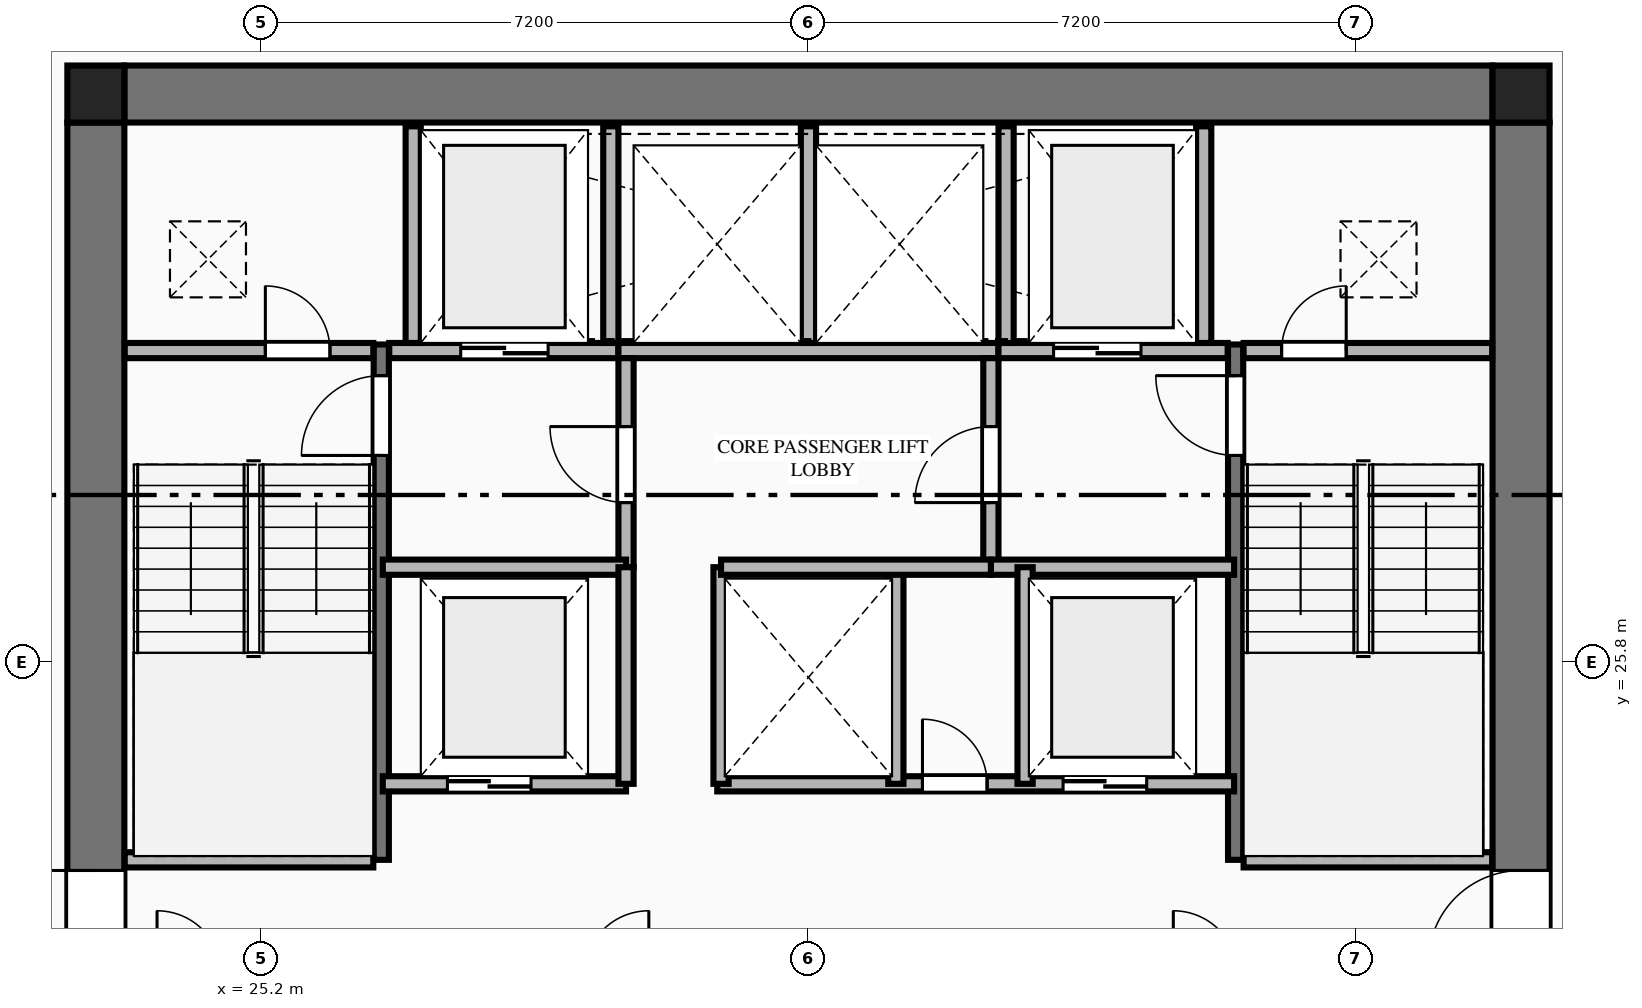
"""IFC4 building model, lengths in metres.
Left out: names, types, materials, properties, quantities, classifications, styles, units other than length and angle.
Written with IfcOpenShell. Run it as: python <this file> out.ifc"""

import sys

from ifc_helpers import new_model, si_unit, direction, frame, frame_2d, origin, origin_2d, place, context, subcontext, project, spatial, rectangle, extrude, element, fill, save


model = new_model("IFC4")
c1 = context("Model", 3, precision=1e-05, world=origin(), true_north=direction((0.0, 1.0)))
c2 = subcontext(c1, "Body", "Model", "MODEL_VIEW")
j1 = project(units=[si_unit("LENGTHUNIT", "METRE"), si_unit("PLANEANGLEUNIT", "RADIAN")], contexts=[c1])
p1 = place(None, origin())
s1 = spatial("IfcSite", under=j1, at=p1, CompositionType="ELEMENT")
p2 = place(p1, origin())
s2 = spatial("IfcBuilding", under=s1, at=p2, CompositionType="ELEMENT")
p3 = place(p2, frame((0.0, 0.0, 116.15)))
s3 = spatial("IfcBuildingStorey", under=s2, at=p3, CompositionType="ELEMENT", Elevation=116.15)
for number, where, z_axis, x_axis in (
    (1, (41.775, 33.275, 0.0), (0.0, 0.0, 1.0), (1.0, 0.0, 0.0)),
    (2, (23.025, 33.275, 0.0), (0.0, 0.0, 1.0), (1.0, 0.0, 0.0)),
):
    element("IfcColumn", number, at=place(p3, frame(where, z_axis=z_axis, x_axis=x_axis)), inside=s3, PredefinedType="COLUMN", context=c2, shape_type="SweptSolid", body=[
        extrude(rectangle(XDim=0.75, YDim=0.75, at=origin_2d()), origin(), (0.0, 0.0, 1.0), 3.55),
    ])
p4 = place(p3, frame((23.4, 33.275, 0.0), z_axis=(0.0, 0.0, 1.0), x_axis=(1.0, 0.0, 0.0)))
e3 = element("IfcWall", 3, at=p4, inside=s3, PredefinedType="SHEAR", context=c2, shape_type="SweptSolid", body=[
    extrude(rectangle(XDim=18.0, YDim=0.75, at=frame_2d((9.0, 0.0))), origin(), (0.0, 0.0, 1.0), 3.34),
])
p5 = place(p3, frame((23.025, 18.9, 0.0), z_axis=(0.0, 0.0, 1.0), x_axis=(0.0, 1.0, 0.0)))
e4 = element("IfcWall", 4, at=p5, inside=s3, PredefinedType="SHEAR", context=c2, shape_type="SweptSolid", body=[
    extrude(rectangle(XDim=14.0, YDim=0.75, at=frame_2d((7.0, 0.0))), origin(), (0.0, 0.0, 1.0), 3.34),
])
p6 = place(p5, frame((2.94, 0.0, 0.0)))
e5 = element("IfcOpeningElement", 5, at=p6, cuts=e4, PredefinedType="OPENING", context=c2, shape_type="SweptSolid", body=[
    extrude(rectangle(XDim=1.22, YDim=2.25, at=frame_2d((0.61, 1.125))), frame((0.0, 0.385, 0.0), z_axis=(0.0, -1.0, 0.0), x_axis=(1.0, 0.0, 0.0)), (0.0, 0.0, 1.0), 0.77),
])
p7 = place(p3, frame((41.775, 18.9, 0.0), z_axis=(0.0, 0.0, 1.0), x_axis=(0.0, 1.0, 0.0)))
e6 = element("IfcWall", 6, at=p7, inside=s3, PredefinedType="SHEAR", context=c2, shape_type="SweptSolid", body=[
    extrude(rectangle(XDim=14.0, YDim=0.75, at=frame_2d((7.0, 0.0))), origin(), (0.0, 0.0, 1.0), 3.34),
])
p8 = place(p7, frame((2.94, 0.0, 0.0)))
e7 = element("IfcOpeningElement", 7, at=p8, cuts=e6, PredefinedType="OPENING", context=c2, shape_type="SweptSolid", body=[
    extrude(rectangle(XDim=1.22, YDim=2.25, at=frame_2d((0.61, 1.125))), frame((0.0, 0.385, 0.0), z_axis=(0.0, -1.0, 0.0), x_axis=(1.0, 0.0, 0.0)), (0.0, 0.0, 1.0), 0.77),
])
p9 = place(p3, frame((26.78, 23.2, 0.0), z_axis=(0.0, 0.0, 1.0), x_axis=(0.0, 1.0, 0.0)))
e8 = element("IfcWall", 8, at=p9, inside=s3, PredefinedType="SHEAR", context=c2, shape_type="SweptSolid", body=[
    extrude(rectangle(XDim=6.78, YDim=0.2, at=frame_2d((3.39, 0.0))), origin(), (0.0, 0.0, 1.0), 3.55),
])
p10 = place(p9, frame((5.32, 0.0, 0.0)))
e9 = element("IfcOpeningElement", 9, at=p10, cuts=e8, PredefinedType="OPENING", context=c2, shape_type="SweptSolid", body=[
    extrude(rectangle(XDim=1.05, YDim=2.15, at=frame_2d((0.525, 1.075))), frame((0.0, 0.11, 0.0), z_axis=(0.0, -1.0, 0.0), x_axis=(1.0, 0.0, 0.0)), (0.0, 0.0, 1.0), 0.22),
])
p11 = place(p3, frame((23.405, 23.2, 0.0), z_axis=(0.0, 0.0, 1.0), x_axis=(1.0, 0.0, 0.0)))
e10 = element("IfcWall", 10, at=p11, inside=s3, PredefinedType="PLUMBINGWALL", context=c2, shape_type="SweptSolid", body=[
    extrude(rectangle(XDim=3.27, YDim=0.2, at=frame_2d((1.635, 0.0))), origin(), (0.0, 0.0, 1.0), 3.34),
])
p12 = place(p3, frame((38.02, 23.2, 0.0), z_axis=(0.0, 0.0, 1.0), x_axis=(0.0, 1.0, 0.0)))
e11 = element("IfcWall", 11, at=p12, inside=s3, PredefinedType="SHEAR", context=c2, shape_type="SweptSolid", body=[
    extrude(rectangle(XDim=6.78, YDim=0.2, at=frame_2d((3.39, 0.0))), origin(), (0.0, 0.0, 1.0), 3.55),
])
p13 = place(p12, frame((5.32, 0.0, 0.0)))
e12 = element("IfcOpeningElement", 12, at=p13, cuts=e11, PredefinedType="OPENING", context=c2, shape_type="SweptSolid", body=[
    extrude(rectangle(XDim=1.05, YDim=2.15, at=frame_2d((0.525, 1.075))), frame((0.0, 0.11, 0.0), z_axis=(0.0, -1.0, 0.0), x_axis=(1.0, 0.0, 0.0)), (0.0, 0.0, 1.0), 0.22),
])
p14 = place(p3, frame((38.125, 23.2, 0.0), z_axis=(0.0, 0.0, 1.0), x_axis=(1.0, 0.0, 0.0)))
e13 = element("IfcWall", 13, at=p14, inside=s3, PredefinedType="PLUMBINGWALL", context=c2, shape_type="SweptSolid", body=[
    extrude(rectangle(XDim=3.27, YDim=0.2, at=frame_2d((1.635, 0.0))), origin(), (0.0, 0.0, 1.0), 3.34),
])
p15 = place(p3, frame((23.405, 29.9, 0.0), z_axis=(0.0, 0.0, 1.0), x_axis=(1.0, 0.0, 0.0)))
e14 = element("IfcWall", 14, at=p15, inside=s3, PredefinedType="PLUMBINGWALL", context=c2, shape_type="SweptSolid", body=[
    extrude(rectangle(XDim=3.27, YDim=0.2, at=frame_2d((1.635, 0.0))), origin(), (0.0, 0.0, 1.0), 3.34),
])
p16 = place(p15, frame((1.85, 0.0, 0.0)))
e15 = element("IfcOpeningElement", 15, at=p16, cuts=e14, PredefinedType="OPENING", context=c2, shape_type="SweptSolid", body=[
    extrude(rectangle(XDim=0.85, YDim=2.05, at=frame_2d((0.425, 1.025))), frame((0.0, 0.11, 0.0), z_axis=(0.0, -1.0, 0.0), x_axis=(1.0, 0.0, 0.0)), (0.0, 0.0, 1.0), 0.22),
])
p17 = place(p3, frame((26.885, 29.9, 0.0), z_axis=(0.0, 0.0, 1.0), x_axis=(1.0, 0.0, 0.0)))
e16 = element("IfcWall", 16, at=p17, inside=s3, PredefinedType="PLUMBINGWALL", context=c2, shape_type="SweptSolid", body=[
    extrude(rectangle(XDim=3.015, YDim=0.2, at=frame_2d((1.507, 0.0))), origin(), (0.0, 0.0, 1.0), 3.34),
])
p18 = place(p17, frame((0.94, 0.0, 0.0)))
e17 = element("IfcOpeningElement", 17, at=p18, cuts=e16, PredefinedType="OPENING", context=c2, shape_type="SweptSolid", body=[
    extrude(rectangle(XDim=1.15, YDim=2.2, at=frame_2d((0.575, 1.1))), frame((0.0, 0.11, 0.0), z_axis=(0.0, -1.0, 0.0), x_axis=(1.0, 0.0, 0.0)), (0.0, 0.0, 1.0), 0.22),
])
p19 = place(p3, frame((29.9, 29.9, 0.0), z_axis=(0.0, 0.0, 1.0), x_axis=(1.0, 0.0, 0.0)))
e18 = element("IfcWall", 18, at=p19, inside=s3, PredefinedType="PLUMBINGWALL", context=c2, shape_type="SweptSolid", body=[
    extrude(rectangle(XDim=5.0, YDim=0.2, at=frame_2d((2.5, 0.0))), origin(), (0.0, 0.0, 1.0), 3.34),
])
p20 = place(p3, frame((34.9, 29.9, 0.0), z_axis=(0.0, 0.0, 1.0), x_axis=(1.0, 0.0, 0.0)))
e19 = element("IfcWall", 19, at=p20, inside=s3, PredefinedType="PLUMBINGWALL", context=c2, shape_type="SweptSolid", body=[
    extrude(rectangle(XDim=3.015, YDim=0.2, at=frame_2d((1.508, 0.0))), origin(), (0.0, 0.0, 1.0), 3.34),
])
p21 = place(p20, frame((0.725, 0.0, 0.0)))
e20 = element("IfcOpeningElement", 20, at=p21, cuts=e19, PredefinedType="OPENING", context=c2, shape_type="SweptSolid", body=[
    extrude(rectangle(XDim=1.15, YDim=2.2, at=frame_2d((0.575, 1.1))), frame((0.0, 0.11, 0.0), z_axis=(0.0, -1.0, 0.0), x_axis=(1.0, 0.0, 0.0)), (0.0, 0.0, 1.0), 0.22),
])
p22 = place(p3, frame((38.125, 29.9, 0.0), z_axis=(0.0, 0.0, 1.0), x_axis=(1.0, 0.0, 0.0)))
e21 = element("IfcWall", 21, at=p22, inside=s3, PredefinedType="PLUMBINGWALL", context=c2, shape_type="SweptSolid", body=[
    extrude(rectangle(XDim=3.27, YDim=0.2, at=frame_2d((1.635, 0.0))), origin(), (0.0, 0.0, 1.0), 3.34),
])
p23 = place(p22, frame((0.5, 0.0, 0.0)))
e22 = element("IfcOpeningElement", 22, at=p23, cuts=e21, PredefinedType="OPENING", context=c2, shape_type="SweptSolid", body=[
    extrude(rectangle(XDim=0.85, YDim=2.05, at=frame_2d((0.425, 1.025))), frame((0.0, 0.11, 0.0), z_axis=(0.0, -1.0, 0.0), x_axis=(1.0, 0.0, 0.0)), (0.0, 0.0, 1.0), 0.22),
])
for number, where, z_axis, x_axis in (
    (23, (27.2, 30.0, 0.0), (0.0, 0.0, 1.0), (0.0, 1.0, 0.0)),
    (24, (29.8, 30.0, 0.0), (0.0, 0.0, 1.0), (0.0, 1.0, 0.0)),
    (25, (32.4, 30.0, 0.0), (0.0, 0.0, 1.0), (0.0, 1.0, 0.0)),
    (26, (35.0, 30.0, 0.0), (0.0, 0.0, 1.0), (0.0, 1.0, 0.0)),
    (27, (37.6, 30.0, 0.0), (0.0, 0.0, 1.0), (0.0, 1.0, 0.0)),
):
    element("IfcWall", number, at=place(p3, frame(where, z_axis=z_axis, x_axis=x_axis)), inside=s3, PredefinedType="PLUMBINGWALL", context=c2, shape_type="SweptSolid", body=[
        extrude(rectangle(XDim=2.85, YDim=0.2, at=frame_2d((1.425, 0.0))), origin(), (0.0, 0.0, 1.0), 3.34),
    ])
p24 = place(p3, frame((30.0, 27.05, 0.0), z_axis=(0.0, 0.0, 1.0), x_axis=(0.0, 1.0, 0.0)))
e28 = element("IfcWall", 28, at=p24, inside=s3, PredefinedType="PLUMBINGWALL", context=c2, shape_type="SweptSolid", body=[
    extrude(rectangle(XDim=2.75, YDim=0.2, at=frame_2d((1.375, 0.0))), origin(), (0.0, 0.0, 1.0), 3.34),
])
p25 = place(p24, frame((0.85, 0.0, 0.0)))
e29 = element("IfcOpeningElement", 29, at=p25, cuts=e28, PredefinedType="OPENING", context=c2, shape_type="SweptSolid", body=[
    extrude(rectangle(XDim=1.0, YDim=2.15, at=frame_2d((0.5, 1.075))), frame((0.0, 0.11, 0.0), z_axis=(0.0, -1.0, 0.0), x_axis=(1.0, 0.0, 0.0)), (0.0, 0.0, 1.0), 0.22),
])
p26 = place(p3, frame((26.8, 27.05, 0.0), z_axis=(0.0, 0.0, 1.0), x_axis=(1.0, 0.0, 0.0)))
e30 = element("IfcWall", 30, at=p26, inside=s3, PredefinedType="PLUMBINGWALL", context=c2, shape_type="SweptSolid", body=[
    extrude(rectangle(XDim=3.2, YDim=0.2, at=frame_2d((1.6, 0.0))), origin(), (0.0, 0.0, 1.0), 3.34),
])
p27 = place(p3, frame((34.8, 27.05, 0.0), z_axis=(0.0, 0.0, 1.0), x_axis=(0.0, 1.0, 0.0)))
e31 = element("IfcWall", 31, at=p27, inside=s3, PredefinedType="PLUMBINGWALL", context=c2, shape_type="SweptSolid", body=[
    extrude(rectangle(XDim=2.75, YDim=0.2, at=frame_2d((1.375, 0.0))), origin(), (0.0, 0.0, 1.0), 3.34),
])
p28 = place(p27, frame((0.85, 0.0, 0.0)))
e32 = element("IfcOpeningElement", 32, at=p28, cuts=e31, PredefinedType="OPENING", context=c2, shape_type="SweptSolid", body=[
    extrude(rectangle(XDim=1.0, YDim=2.15, at=frame_2d((0.5, 1.075))), frame((0.0, 0.11, 0.0), z_axis=(0.0, -1.0, 0.0), x_axis=(1.0, 0.0, 0.0)), (0.0, 0.0, 1.0), 0.22),
])
p29 = place(p3, frame((34.8, 27.05, 0.0), z_axis=(0.0, 0.0, 1.0), x_axis=(1.0, 0.0, 0.0)))
e33 = element("IfcWall", 33, at=p29, inside=s3, PredefinedType="PLUMBINGWALL", context=c2, shape_type="SweptSolid", body=[
    extrude(rectangle(XDim=3.2, YDim=0.2, at=frame_2d((1.6, 0.0))), origin(), (0.0, 0.0, 1.0), 3.34),
])
p30 = place(p3, frame((26.8, 24.2, 0.0), z_axis=(0.0, 0.0, 1.0), x_axis=(1.0, 0.0, 0.0)))
e34 = element("IfcWall", 34, at=p30, inside=s3, PredefinedType="PLUMBINGWALL", context=c2, shape_type="SweptSolid", body=[
    extrude(rectangle(XDim=3.2, YDim=0.2, at=frame_2d((1.6, 0.0))), origin(), (0.0, 0.0, 1.0), 3.34),
])
p31 = place(p30, frame((0.85, 0.0, 0.0)))
e35 = element("IfcOpeningElement", 35, at=p31, cuts=e34, PredefinedType="OPENING", context=c2, shape_type="SweptSolid", body=[
    extrude(rectangle(XDim=1.1, YDim=2.2, at=frame_2d((0.55, 1.1))), frame((0.0, 0.11, 0.0), z_axis=(0.0, -1.0, 0.0), x_axis=(1.0, 0.0, 0.0)), (0.0, 0.0, 1.0), 0.22),
])
p32 = place(p3, frame((30.0, 24.2, 0.0), z_axis=(0.0, 0.0, 1.0), x_axis=(0.0, 1.0, 0.0)))
e36 = element("IfcWall", 36, at=p32, inside=s3, PredefinedType="PLUMBINGWALL", context=c2, shape_type="SweptSolid", body=[
    extrude(rectangle(XDim=2.85, YDim=0.2, at=frame_2d((1.425, 0.0))), origin(), (0.0, 0.0, 1.0), 3.34),
])
p33 = place(p3, frame((31.2, 24.2, 0.0), z_axis=(0.0, 0.0, 1.0), x_axis=(1.0, 0.0, 0.0)))
e37 = element("IfcWall", 37, at=p33, inside=s3, PredefinedType="PLUMBINGWALL", context=c2, shape_type="SweptSolid", body=[
    extrude(rectangle(XDim=6.8, YDim=0.2, at=frame_2d((3.4, 0.0))), origin(), (0.0, 0.0, 1.0), 3.34),
])
p34 = place(p33, frame((2.7, 0.0, 0.0)))
e38 = element("IfcOpeningElement", 38, at=p34, cuts=e37, PredefinedType="OPENING", context=c2, shape_type="SweptSolid", body=[
    extrude(rectangle(XDim=0.85, YDim=2.05, at=frame_2d((0.425, 1.025))), frame((0.0, 0.11, 0.0), z_axis=(0.0, -1.0, 0.0), x_axis=(1.0, 0.0, 0.0)), (0.0, 0.0, 1.0), 0.22),
])
p35 = place(p33, frame((4.55, 0.0, 0.0)))
e39 = element("IfcOpeningElement", 39, at=p35, cuts=e37, PredefinedType="OPENING", context=c2, shape_type="SweptSolid", body=[
    extrude(rectangle(XDim=1.1, YDim=2.2, at=frame_2d((0.55, 1.1))), frame((0.0, 0.11, 0.0), z_axis=(0.0, -1.0, 0.0), x_axis=(1.0, 0.0, 0.0)), (0.0, 0.0, 1.0), 0.22),
])
for number, where, z_axis, x_axis in (
    (40, (31.25, 24.2, 0.0), (0.0, 0.0, 1.0), (0.0, 1.0, 0.0)),
    (41, (33.55, 24.2, 0.0), (0.0, 0.0, 1.0), (0.0, 1.0, 0.0)),
    (42, (35.25, 24.2, 0.0), (0.0, 0.0, 1.0), (0.0, 1.0, 0.0)),
):
    element("IfcWall", number, at=place(p3, frame(where, z_axis=z_axis, x_axis=x_axis)), inside=s3, PredefinedType="PLUMBINGWALL", context=c2, shape_type="SweptSolid", body=[
        extrude(rectangle(XDim=2.85, YDim=0.2, at=frame_2d((1.425, 0.0))), origin(), (0.0, 0.0, 1.0), 3.34),
    ])
p36 = place(p3, frame((31.25, 27.05, 0.0), z_axis=(0.0, 0.0, 1.0), x_axis=(1.0, 0.0, 0.0)))
e43 = element("IfcWall", 43, at=p36, inside=s3, PredefinedType="PLUMBINGWALL", context=c2, shape_type="SweptSolid", body=[
    extrude(rectangle(XDim=3.55, YDim=0.2, at=frame_2d((1.775, 0.0))), origin(), (0.0, 0.0, 1.0), 3.34),
])
p37 = place(p6, origin())
e44 = element("IfcDoor", 44, at=p37, inside=s3, OperationType="SINGLE_SWING_RIGHT", PredefinedType="DOOR", context=c2, shape_type="SweptSolid", body=[
    extrude(rectangle(XDim=1.22, YDim=2.25, at=frame_2d((0.61, 1.125))), frame((0.0, 0.025, 0.0), z_axis=(0.0, -1.0, 0.0), x_axis=(1.0, 0.0, 0.0)), (0.0, 0.0, 1.0), 0.05),
])
fill(e5, e44)
p38 = place(p8, origin())
e45 = element("IfcDoor", 45, at=p38, inside=s3, OperationType="SINGLE_SWING_LEFT", PredefinedType="DOOR", context=c2, shape_type="SweptSolid", body=[
    extrude(rectangle(XDim=1.22, YDim=2.25, at=frame_2d((0.61, 1.125))), frame((0.0, 0.025, 0.0), z_axis=(0.0, -1.0, 0.0), x_axis=(1.0, 0.0, 0.0)), (0.0, 0.0, 1.0), 0.05),
])
fill(e7, e45)
p39 = place(p10, origin())
e46 = element("IfcDoor", 46, at=p39, inside=s3, OperationType="SINGLE_SWING_LEFT", PredefinedType="DOOR", context=c2, shape_type="SweptSolid", body=[
    extrude(rectangle(XDim=1.05, YDim=2.15, at=frame_2d((0.525, 1.075))), frame((0.0, 0.025, 0.0), z_axis=(0.0, -1.0, 0.0), x_axis=(1.0, 0.0, 0.0)), (0.0, 0.0, 1.0), 0.05),
])
fill(e9, e46)
p40 = place(p13, origin())
e47 = element("IfcDoor", 47, at=p40, inside=s3, OperationType="SINGLE_SWING_RIGHT", PredefinedType="DOOR", context=c2, shape_type="SweptSolid", body=[
    extrude(rectangle(XDim=1.05, YDim=2.15, at=frame_2d((0.525, 1.075))), frame((0.0, 0.025, 0.0), z_axis=(0.0, -1.0, 0.0), x_axis=(1.0, 0.0, 0.0)), (0.0, 0.0, 1.0), 0.05),
])
fill(e12, e47)
p41 = place(p16, origin())
e48 = element("IfcDoor", 48, at=p41, inside=s3, OperationType="SINGLE_SWING_LEFT", PredefinedType="DOOR", context=c2, shape_type="SweptSolid", body=[
    extrude(rectangle(XDim=0.85, YDim=2.05, at=frame_2d((0.425, 1.025))), frame((0.0, 0.025, 0.0), z_axis=(0.0, -1.0, 0.0), x_axis=(1.0, 0.0, 0.0)), (0.0, 0.0, 1.0), 0.05),
])
fill(e15, e48)
p42 = place(p23, origin())
e49 = element("IfcDoor", 49, at=p42, inside=s3, OperationType="SINGLE_SWING_RIGHT", PredefinedType="DOOR", context=c2, shape_type="SweptSolid", body=[
    extrude(rectangle(XDim=0.85, YDim=2.05, at=frame_2d((0.425, 1.025))), frame((0.0, 0.025, 0.0), z_axis=(0.0, -1.0, 0.0), x_axis=(1.0, 0.0, 0.0)), (0.0, 0.0, 1.0), 0.05),
])
fill(e22, e49)
p43 = place(p18, origin())
e50 = element("IfcDoor", 50, at=p43, inside=s3, OperationType="DOUBLE_DOOR_SLIDING", PredefinedType="DOOR", context=c2, shape_type="SweptSolid", body=[
    extrude(rectangle(XDim=1.15, YDim=2.2, at=frame_2d((0.575, 1.1))), frame((0.0, 0.025, 0.0), z_axis=(0.0, -1.0, 0.0), x_axis=(1.0, 0.0, 0.0)), (0.0, 0.0, 1.0), 0.05),
])
fill(e17, e50)
p44 = place(p21, origin())
e51 = element("IfcDoor", 51, at=p44, inside=s3, OperationType="DOUBLE_DOOR_SLIDING", PredefinedType="DOOR", context=c2, shape_type="SweptSolid", body=[
    extrude(rectangle(XDim=1.15, YDim=2.2, at=frame_2d((0.575, 1.1))), frame((0.0, 0.025, 0.0), z_axis=(0.0, -1.0, 0.0), x_axis=(1.0, 0.0, 0.0)), (0.0, 0.0, 1.0), 0.05),
])
fill(e20, e51)
p45 = place(p25, origin())
e52 = element("IfcDoor", 52, at=p45, inside=s3, OperationType="SINGLE_SWING_RIGHT", PredefinedType="DOOR", context=c2, shape_type="SweptSolid", body=[
    extrude(rectangle(XDim=1.0, YDim=2.15, at=frame_2d((0.5, 1.075))), frame((0.0, 0.025, 0.0), z_axis=(0.0, -1.0, 0.0), x_axis=(1.0, 0.0, 0.0)), (0.0, 0.0, 1.0), 0.05),
])
fill(e29, e52)
p46 = place(p28, origin())
e53 = element("IfcDoor", 53, at=p46, inside=s3, OperationType="SINGLE_SWING_LEFT", PredefinedType="DOOR", context=c2, shape_type="SweptSolid", body=[
    extrude(rectangle(XDim=1.0, YDim=2.15, at=frame_2d((0.5, 1.075))), frame((0.0, 0.025, 0.0), z_axis=(0.0, -1.0, 0.0), x_axis=(1.0, 0.0, 0.0)), (0.0, 0.0, 1.0), 0.05),
])
fill(e32, e53)
p47 = place(p31, origin())
e54 = element("IfcDoor", 54, at=p47, inside=s3, OperationType="DOUBLE_DOOR_SLIDING", PredefinedType="DOOR", context=c2, shape_type="SweptSolid", body=[
    extrude(rectangle(XDim=1.1, YDim=2.2, at=frame_2d((0.55, 1.1))), frame((0.0, 0.025, 0.0), z_axis=(0.0, -1.0, 0.0), x_axis=(1.0, 0.0, 0.0)), (0.0, 0.0, 1.0), 0.05),
])
fill(e35, e54)
p48 = place(p34, origin())
e55 = element("IfcDoor", 55, at=p48, inside=s3, OperationType="SINGLE_SWING_LEFT", PredefinedType="DOOR", context=c2, shape_type="SweptSolid", body=[
    extrude(rectangle(XDim=0.85, YDim=2.05, at=frame_2d((0.425, 1.025))), frame((0.0, 0.025, 0.0), z_axis=(0.0, -1.0, 0.0), x_axis=(1.0, 0.0, 0.0)), (0.0, 0.0, 1.0), 0.05),
])
fill(e38, e55)
p49 = place(p35, origin())
e56 = element("IfcDoor", 56, at=p49, inside=s3, OperationType="DOUBLE_DOOR_SLIDING", PredefinedType="DOOR", context=c2, shape_type="SweptSolid", body=[
    extrude(rectangle(XDim=1.1, YDim=2.2, at=frame_2d((0.55, 1.1))), frame((0.0, 0.025, 0.0), z_axis=(0.0, -1.0, 0.0), x_axis=(1.0, 0.0, 0.0)), (0.0, 0.0, 1.0), 0.05),
])
fill(e39, e56)
save(model, sys.argv[1])
